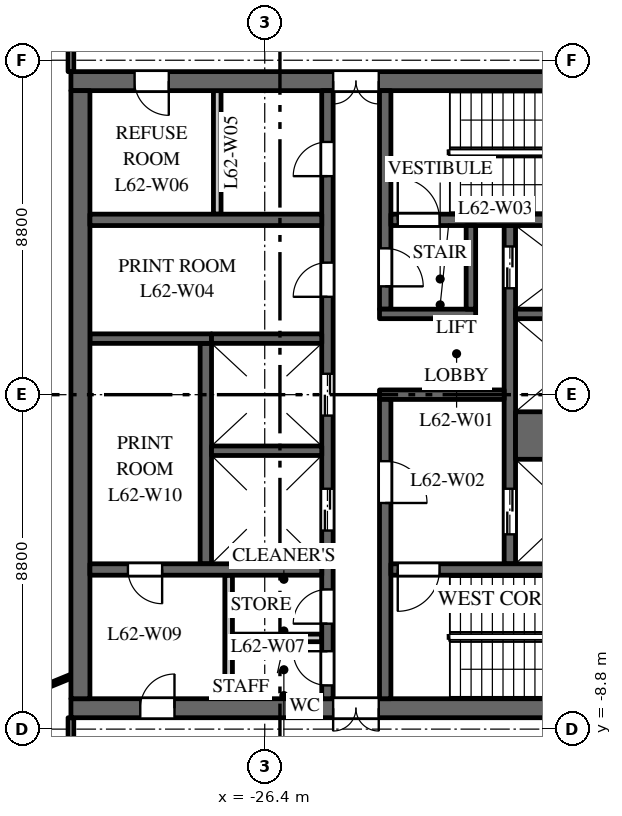
"""IFC4 building model, lengths in metres.
Left out: names, types, materials, properties, quantities, classifications, styles, units other than length and angle.
Written with IfcOpenShell. Run it as: python <this file> out.ifc"""

import sys

from ifc_helpers import new_model, si_unit, direction, frame, frame_2d, origin, place, context, subcontext, project, spatial, rectangle, extrude, element, fill, save


model = new_model("IFC4")
c1 = context("Model", 3, precision=1e-05, world=origin(), true_north=direction((0.0, 1.0)))
c2 = subcontext(c1, "Body", "Model", "MODEL_VIEW")
j1 = project(units=[si_unit("LENGTHUNIT", "METRE"), si_unit("PLANEANGLEUNIT", "RADIAN")], contexts=[c1])
p1 = place(None, origin())
s1 = spatial("IfcSite", under=j1, at=p1, CompositionType="ELEMENT")
p2 = place(p1, origin())
s2 = spatial("IfcBuilding", under=s1, at=p2, CompositionType="ELEMENT")
p3 = place(p2, frame((0.0, 0.0, 291.0)))
s3 = spatial("IfcBuildingStorey", under=s2, at=p3, CompositionType="ELEMENT", Elevation=291.0)
p4 = place(p3, frame((-16.5, 8.25, 0.0), z_axis=(0.0, 0.0, 1.0), x_axis=(-1.0, 0.0, 0.0)))
e1 = element("IfcWall", 1, at=p4, inside=s3, PredefinedType="SHEAR", context=c2, shape_type="SweptSolid", body=[
    extrude(rectangle(XDim=15.0, YDim=0.5, at=frame_2d((7.5, 0.0))), origin(), (0.0, 0.0, 1.0), 3.7),
])
p5 = place(p4, frame((6.9, 0.0, 0.0)))
e2 = element("IfcOpeningElement", 2, at=p5, cuts=e1, PredefinedType="OPENING", context=c2, shape_type="SweptSolid", body=[
    extrude(rectangle(XDim=1.2, YDim=2.1, at=frame_2d((0.6, 1.05))), frame((0.0, 0.26, 0.0), z_axis=(0.0, -1.0, 0.0), x_axis=(1.0, 0.0, 0.0)), (0.0, 0.0, 1.0), 0.52),
])
p6 = place(p4, frame((12.425, 0.0, 0.0)))
e3 = element("IfcOpeningElement", 3, at=p6, cuts=e1, PredefinedType="OPENING", context=c2, shape_type="SweptSolid", body=[
    extrude(rectangle(XDim=0.9, YDim=2.1, at=frame_2d((0.45, 1.05))), frame((0.0, 0.26, 0.0), z_axis=(0.0, -1.0, 0.0), x_axis=(1.0, 0.0, 0.0)), (0.0, 0.0, 1.0), 0.52),
])
p7 = place(p3, frame((-16.5, -8.25, 0.0), z_axis=(0.0, 0.0, 1.0), x_axis=(-1.0, 0.0, 0.0)))
e4 = element("IfcWall", 4, at=p7, inside=s3, PredefinedType="SHEAR", context=c2, shape_type="SweptSolid", body=[
    extrude(rectangle(XDim=15.0, YDim=0.5, at=frame_2d((7.5, 0.0))), origin(), (0.0, 0.0, 1.0), 3.7),
])
p8 = place(p7, frame((6.9, 0.0, 0.0)))
e5 = element("IfcOpeningElement", 5, at=p8, cuts=e4, PredefinedType="OPENING", context=c2, shape_type="SweptSolid", body=[
    extrude(rectangle(XDim=1.2, YDim=2.1, at=frame_2d((0.6, 1.05))), frame((0.0, 0.26, 0.0), z_axis=(0.0, -1.0, 0.0), x_axis=(1.0, 0.0, 0.0)), (0.0, 0.0, 1.0), 0.52),
])
p9 = place(p7, frame((12.275, 0.0, 0.0)))
e6 = element("IfcOpeningElement", 6, at=p9, cuts=e4, PredefinedType="OPENING", context=c2, shape_type="SweptSolid", body=[
    extrude(rectangle(XDim=0.9, YDim=2.1, at=frame_2d((0.45, 1.05))), frame((0.0, 0.26, 0.0), z_axis=(0.0, -1.0, 0.0), x_axis=(1.0, 0.0, 0.0)), (0.0, 0.0, 1.0), 0.52),
])
p10 = place(p3, frame((-27.95, -4.45, 0.0), z_axis=(0.0, 0.0, 1.0), x_axis=(0.0, 1.0, 0.0)))
e7 = element("IfcWall", 7, at=p10, inside=s3, PredefinedType="SHEAR", context=c2, shape_type="SweptSolid", body=[
    extrude(rectangle(XDim=5.8, YDim=0.3, at=frame_2d((2.9, 0.0))), origin(), (0.0, 0.0, 1.0), 3.7),
])
p11 = place(p3, frame((-27.8, 1.475, 0.0), z_axis=(0.0, 0.0, 1.0), x_axis=(-1.0, 0.0, 0.0)))
e8 = element("IfcWall", 8, at=p11, inside=s3, PredefinedType="SHEAR", context=c2, shape_type="SweptSolid", body=[
    extrude(rectangle(XDim=3.2, YDim=0.25, at=frame_2d((1.6, 0.0))), origin(), (0.0, 0.0, 1.0), 3.7),
])
p12 = place(p3, frame((-19.95, -4.45, 0.0), z_axis=(0.0, 0.0, 1.0), x_axis=(0.0, 1.0, 0.0)))
e9 = element("IfcWall", 9, at=p12, inside=s3, PredefinedType="SHEAR", context=c2, shape_type="SweptSolid", body=[
    extrude(rectangle(XDim=8.9, YDim=0.3, at=frame_2d((4.45, 0.0))), origin(), (0.0, 0.0, 1.0), 3.7),
])
p13 = place(p12, frame((0.775, 0.0, 0.0)))
e10 = element("IfcOpeningElement", 10, at=p13, cuts=e9, PredefinedType="OPENING", context=c2, shape_type="SweptSolid", body=[
    extrude(rectangle(XDim=1.2, YDim=2.1, at=frame_2d((0.6, 1.05))), frame((0.0, 0.16, 0.0), z_axis=(0.0, -1.0, 0.0), x_axis=(1.0, 0.0, 0.0)), (0.0, 0.0, 1.0), 0.32),
])
p14 = place(p12, frame((7.25, 0.0, 0.0)))
e11 = element("IfcOpeningElement", 11, at=p14, cuts=e9, PredefinedType="OPENING", context=c2, shape_type="SweptSolid", body=[
    extrude(rectangle(XDim=1.1, YDim=2.1, at=frame_2d((0.55, 1.05))), frame((0.0, 0.16, 0.0), z_axis=(0.0, -1.0, 0.0), x_axis=(1.0, 0.0, 0.0)), (0.0, 0.0, 1.0), 0.32),
])
p15 = place(p3, frame((-24.75, -8.0, 0.0), z_axis=(0.0, 0.0, 1.0), x_axis=(0.0, 1.0, 0.0)))
e12 = element("IfcWall", 12, at=p15, inside=s3, PredefinedType="SHEAR", context=c2, shape_type="SweptSolid", body=[
    extrude(rectangle(XDim=16.0, YDim=0.3, at=frame_2d((8.0, 0.0))), origin(), (0.0, 0.0, 1.0), 3.7),
])
p16 = place(p15, frame((4.425, 0.0, 0.0)))
e13 = element("IfcOpeningElement", 13, at=p16, cuts=e12, PredefinedType="OPENING", context=c2, shape_type="SweptSolid", body=[
    extrude(rectangle(XDim=1.1, YDim=2.1, at=frame_2d((0.55, 1.05))), frame((0.0, 0.16, 0.0), z_axis=(0.0, -1.0, 0.0), x_axis=(1.0, 0.0, 0.0)), (0.0, 0.0, 1.0), 0.32),
])
p17 = place(p15, frame((7.45, 0.0, 0.0)))
e14 = element("IfcOpeningElement", 14, at=p17, cuts=e12, PredefinedType="OPENING", context=c2, shape_type="SweptSolid", body=[
    extrude(rectangle(XDim=1.1, YDim=2.1, at=frame_2d((0.55, 1.05))), frame((0.0, 0.16, 0.0), z_axis=(0.0, -1.0, 0.0), x_axis=(1.0, 0.0, 0.0)), (0.0, 0.0, 1.0), 0.32),
])
p18 = place(p15, frame((10.575, 0.0, 0.0)))
e15 = element("IfcOpeningElement", 15, at=p18, cuts=e12, PredefinedType="OPENING", context=c2, shape_type="SweptSolid", body=[
    extrude(rectangle(XDim=0.9, YDim=2.1, at=frame_2d((0.45, 1.05))), frame((0.0, 0.16, 0.0), z_axis=(0.0, -1.0, 0.0), x_axis=(1.0, 0.0, 0.0)), (0.0, 0.0, 1.0), 0.32),
])
p19 = place(p15, frame((13.75, 0.0, 0.0)))
e16 = element("IfcOpeningElement", 16, at=p19, cuts=e12, PredefinedType="OPENING", context=c2, shape_type="SweptSolid", body=[
    extrude(rectangle(XDim=0.9, YDim=2.1, at=frame_2d((0.45, 1.05))), frame((0.0, 0.16, 0.0), z_axis=(0.0, -1.0, 0.0), x_axis=(1.0, 0.0, 0.0)), (0.0, 0.0, 1.0), 0.32),
])
p20 = place(p15, frame((1.975, 0.0, 0.0)))
e17 = element("IfcOpeningElement", 17, at=p20, cuts=e12, PredefinedType="OPENING", context=c2, shape_type="SweptSolid", body=[
    extrude(rectangle(XDim=0.9, YDim=2.1, at=frame_2d((0.45, 1.05))), frame((0.0, 0.16, 0.0), z_axis=(0.0, -1.0, 0.0), x_axis=(1.0, 0.0, 0.0)), (0.0, 0.0, 1.0), 0.32),
])
p21 = place(p15, frame((0.35, 0.0, 0.0)))
e18 = element("IfcOpeningElement", 18, at=p21, cuts=e12, PredefinedType="OPENING", context=c2, shape_type="SweptSolid", body=[
    extrude(rectangle(XDim=0.9, YDim=2.1, at=frame_2d((0.45, 1.05))), frame((0.0, 0.16, 0.0), z_axis=(0.0, -1.0, 0.0), x_axis=(1.0, 0.0, 0.0)), (0.0, 0.0, 1.0), 0.32),
])
p22 = place(p3, frame((-20.1, 0.0, 0.0), z_axis=(0.0, 0.0, 1.0), x_axis=(-1.0, 0.0, 0.0)))
e19 = element("IfcWall", 19, at=p22, inside=s3, PredefinedType="SHEAR", context=c2, shape_type="SweptSolid", body=[
    extrude(rectangle(XDim=3.28, YDim=0.25, at=frame_2d((1.64, 0.0))), origin(), (0.0, 0.0, 1.0), 3.7),
])
p23 = place(p3, frame((-31.25, -8.0, 0.0), z_axis=(0.0, 0.0, 1.0), x_axis=(0.0, 1.0, 0.0)))
e20 = element("IfcWall", 20, at=p23, inside=s3, PredefinedType="SHEAR", context=c2, shape_type="SweptSolid", body=[
    extrude(rectangle(XDim=16.0, YDim=0.5, at=frame_2d((8.0, 0.0))), origin(), (0.0, 0.0, 1.0), 3.7),
])
p24 = place(p3, frame((-24.9, 4.6, 0.0), z_axis=(0.0, 0.0, 1.0), x_axis=(-1.0, 0.0, 0.0)))
e21 = element("IfcWall", 21, at=p24, inside=s3, PredefinedType="SHEAR", context=c2, shape_type="SweptSolid", body=[
    extrude(rectangle(XDim=6.1, YDim=0.3, at=frame_2d((3.05, 0.0))), origin(), (0.0, 0.0, 1.0), 3.7),
])
for number, where, z_axis, x_axis in (
    (22, (-27.65, 4.75, 0.0), (0.0, 0.0, 1.0), (0.0, 1.0, 0.0)),
    (23, (-27.35, -8.0, 0.0), (0.0, 0.0, 1.0), (0.0, 1.0, 0.0)),
):
    element("IfcWall", number, at=place(p3, frame(where, z_axis=z_axis, x_axis=x_axis)), inside=s3, PredefinedType="PARTITIONING", context=c2, shape_type="SweptSolid", body=[
        extrude(rectangle(XDim=3.25, YDim=0.2, at=frame_2d((1.625, 0.0))), origin(), (0.0, 0.0, 1.0), 3.7),
    ])
p25 = place(p3, frame((-24.9, -6.4, 0.0), z_axis=(0.0, 0.0, 1.0), x_axis=(-1.0, 0.0, 0.0)))
e24 = element("IfcWall", 24, at=p25, inside=s3, PredefinedType="PARTITIONING", context=c2, shape_type="SweptSolid", body=[
    extrude(rectangle(XDim=2.35, YDim=0.2, at=frame_2d((1.175, 0.0))), origin(), (0.0, 0.0, 1.0), 3.7),
])
p26 = place(p3, frame((-24.9, -4.6, 0.0), z_axis=(0.0, 0.0, 1.0), x_axis=(-1.0, 0.0, 0.0)))
e25 = element("IfcWall", 25, at=p26, inside=s3, PredefinedType="SHEAR", context=c2, shape_type="SweptSolid", body=[
    extrude(rectangle(XDim=6.1, YDim=0.3, at=frame_2d((3.05, 0.0))), origin(), (0.0, 0.0, 1.0), 3.7),
])
p27 = place(p26, frame((4.2, 0.0, 0.0)))
e26 = element("IfcOpeningElement", 26, at=p27, cuts=e25, PredefinedType="OPENING", context=c2, shape_type="SweptSolid", body=[
    extrude(rectangle(XDim=0.9, YDim=2.1, at=frame_2d((0.45, 1.05))), frame((0.0, 0.16, 0.0), z_axis=(0.0, -1.0, 0.0), x_axis=(1.0, 0.0, 0.0)), (0.0, 0.0, 1.0), 0.32),
])
p28 = place(p3, frame((-16.9, -1.075, 0.0), z_axis=(0.0, 0.0, 1.0), x_axis=(-1.0, 0.0, 0.0)))
e27 = element("IfcWall", 27, at=p28, inside=s3, PredefinedType="SHEAR", context=c2, shape_type="SweptSolid", body=[
    extrude(rectangle(XDim=2.9, YDim=1.25, at=frame_2d((1.45, 0.0))), origin(), (0.0, 0.0, 1.0), 3.7),
])
for number, where, z_axis, x_axis in (
    (28, (-16.9, 2.125, 0.0), (0.0, 0.0, 1.0), (-1.0, 0.0, 0.0)),
    (29, (-24.9, -1.475, 0.0), (0.0, 0.0, 1.0), (-1.0, 0.0, 0.0)),
    (30, (-24.9, 1.475, 0.0), (0.0, 0.0, 1.0), (-1.0, 0.0, 0.0)),
):
    element("IfcWall", number, at=place(p3, frame(where, z_axis=z_axis, x_axis=x_axis)), inside=s3, PredefinedType="SHEAR", context=c2, shape_type="SweptSolid", body=[
        extrude(rectangle(XDim=2.9, YDim=0.25, at=frame_2d((1.45, 0.0))), origin(), (0.0, 0.0, 1.0), 3.7),
    ])
p29 = place(p3, frame((-23.23, 2.25, 0.0), z_axis=(0.0, 0.0, 1.0), x_axis=(0.0, 1.0, 0.0)))
e31 = element("IfcWall", 31, at=p29, inside=s3, PredefinedType="SHEAR", context=c2, shape_type="SweptSolid", body=[
    extrude(rectangle(XDim=5.75, YDim=0.3, at=frame_2d((2.875, 0.0))), origin(), (0.0, 0.0, 1.0), 3.7),
])
p30 = place(p29, frame((0.6, 0.0, 0.0)))
e32 = element("IfcOpeningElement", 32, at=p30, cuts=e31, PredefinedType="OPENING", context=c2, shape_type="SweptSolid", body=[
    extrude(rectangle(XDim=1.0, YDim=2.1, at=frame_2d((0.5, 1.05))), frame((0.0, 0.16, 0.0), z_axis=(0.0, -1.0, 0.0), x_axis=(1.0, 0.0, 0.0)), (0.0, 0.0, 1.0), 0.32),
])
p31 = place(p3, frame((-23.23, -8.0, 0.0), z_axis=(0.0, 0.0, 1.0), x_axis=(0.0, 1.0, 0.0)))
e33 = element("IfcWall", 33, at=p31, inside=s3, PredefinedType="SHEAR", context=c2, shape_type="SweptSolid", body=[
    extrude(rectangle(XDim=7.875, YDim=0.3, at=frame_2d((3.938, 0.0))), origin(), (0.0, 0.0, 1.0), 3.7),
])
p32 = place(p31, frame((5.15, 0.0, 0.0)))
e34 = element("IfcOpeningElement", 34, at=p32, cuts=e33, PredefinedType="OPENING", context=c2, shape_type="SweptSolid", body=[
    extrude(rectangle(XDim=1.1, YDim=2.1, at=frame_2d((0.55, 1.05))), frame((0.0, 0.16, 0.0), z_axis=(0.0, -1.0, 0.0), x_axis=(1.0, 0.0, 0.0)), (0.0, 0.0, 1.0), 0.32),
])
p33 = place(p3, frame((-16.9, 4.6, 0.0), z_axis=(0.0, 0.0, 1.0), x_axis=(-1.0, 0.0, 0.0)))
e35 = element("IfcWall", 35, at=p33, inside=s3, PredefinedType="SHEAR", context=c2, shape_type="SweptSolid", body=[
    extrude(rectangle(XDim=6.18, YDim=0.3, at=frame_2d((3.09, 0.0))), origin(), (0.0, 0.0, 1.0), 3.7),
])
p34 = place(p33, frame((4.9, 0.0, 0.0)))
e36 = element("IfcOpeningElement", 36, at=p34, cuts=e35, PredefinedType="OPENING", context=c2, shape_type="SweptSolid", body=[
    extrude(rectangle(XDim=1.1, YDim=2.1, at=frame_2d((0.55, 1.05))), frame((0.0, 0.16, 0.0), z_axis=(0.0, -1.0, 0.0), x_axis=(1.0, 0.0, 0.0)), (0.0, 0.0, 1.0), 0.32),
])
p35 = place(p3, frame((-16.9, -4.6, 0.0), z_axis=(0.0, 0.0, 1.0), x_axis=(-1.0, 0.0, 0.0)))
e37 = element("IfcWall", 37, at=p35, inside=s3, PredefinedType="SHEAR", context=c2, shape_type="SweptSolid", body=[
    extrude(rectangle(XDim=6.18, YDim=0.3, at=frame_2d((3.09, 0.0))), origin(), (0.0, 0.0, 1.0), 3.7),
])
p36 = place(p35, frame((4.9, 0.0, 0.0)))
e38 = element("IfcOpeningElement", 38, at=p36, cuts=e37, PredefinedType="OPENING", context=c2, shape_type="SweptSolid", body=[
    extrude(rectangle(XDim=1.1, YDim=2.1, at=frame_2d((0.55, 1.05))), frame((0.0, 0.16, 0.0), z_axis=(0.0, -1.0, 0.0), x_axis=(1.0, 0.0, 0.0)), (0.0, 0.0, 1.0), 0.32),
])
p37 = place(p3, frame((-20.85, 2.125, 0.0), z_axis=(0.0, 0.0, 1.0), x_axis=(-1.0, 0.0, 0.0)))
e39 = element("IfcWall", 39, at=p37, inside=s3, PredefinedType="SHEAR", context=c2, shape_type="SweptSolid", body=[
    extrude(rectangle(XDim=2.53, YDim=0.25, at=frame_2d((1.265, 0.0))), origin(), (0.0, 0.0, 1.0), 3.7),
])
p38 = place(p3, frame((-20.975, 2.25, 0.0), z_axis=(0.0, 0.0, 1.0), x_axis=(0.0, 1.0, 0.0)))
e40 = element("IfcWall", 40, at=p38, inside=s3, PredefinedType="SHEAR", context=c2, shape_type="SweptSolid", body=[
    extrude(rectangle(XDim=2.2, YDim=0.25, at=frame_2d((1.1, 0.0))), origin(), (0.0, 0.0, 1.0), 3.7),
])
p39 = place(p3, frame((-34.234, -8.53, 0.0), z_axis=(0.0, 0.0, 1.0), x_axis=(0.925344112436, 0.379128307542, 0.0)))
e41 = element("IfcWall", 41, at=p39, inside=s3, PredefinedType="PARTITIONING", context=c2, shape_type="SweptSolid", body=[
    extrude(rectangle(XDim=2.954, YDim=0.1, at=frame_2d((1.477, 0.0))), origin(), (0.0, 0.0, 1.0), 3.0),
])
for number, where, z_axis, x_axis in (
    (42, (-31.5, -11.5, 0.0), (0.0, 0.0, 1.0), (0.0, 1.0, 0.0)),
    (43, (-31.5, 8.5, 0.0), (0.0, 0.0, 1.0), (0.0, 1.0, 0.0)),
):
    element("IfcWall", number, at=place(p3, frame(where, z_axis=z_axis, x_axis=x_axis)), inside=s3, PredefinedType="PARTITIONING", context=c2, shape_type="SweptSolid", body=[
        extrude(rectangle(XDim=3.0, YDim=0.15, at=frame_2d((1.5, 0.0))), origin(), (0.0, 0.0, 1.0), 3.0),
    ])
p40 = place(p13, origin())
e44 = element("IfcDoor", 44, at=p40, inside=s3, OperationType="DOUBLE_DOOR_SLIDING", PredefinedType="DOOR", context=c2, shape_type="SweptSolid", body=[
    extrude(rectangle(XDim=1.2, YDim=2.1, at=frame_2d((0.6, 1.05))), frame((0.0, 0.025, 0.0), z_axis=(0.0, -1.0, 0.0), x_axis=(1.0, 0.0, 0.0)), (0.0, 0.0, 1.0), 0.05),
])
fill(e10, e44)
p41 = place(p14, origin())
e45 = element("IfcDoor", 45, at=p41, inside=s3, OperationType="DOUBLE_DOOR_SLIDING", PredefinedType="DOOR", context=c2, shape_type="SweptSolid", body=[
    extrude(rectangle(XDim=1.1, YDim=2.1, at=frame_2d((0.55, 1.05))), frame((0.0, 0.025, 0.0), z_axis=(0.0, -1.0, 0.0), x_axis=(1.0, 0.0, 0.0)), (0.0, 0.0, 1.0), 0.05),
])
fill(e11, e45)
p42 = place(p16, origin())
e46 = element("IfcDoor", 46, at=p42, inside=s3, OperationType="DOUBLE_DOOR_SLIDING", PredefinedType="DOOR", context=c2, shape_type="SweptSolid", body=[
    extrude(rectangle(XDim=1.1, YDim=2.1, at=frame_2d((0.55, 1.05))), frame((0.0, 0.025, 0.0), z_axis=(0.0, -1.0, 0.0), x_axis=(1.0, 0.0, 0.0)), (0.0, 0.0, 1.0), 0.05),
])
fill(e13, e46)
p43 = place(p17, origin())
e47 = element("IfcDoor", 47, at=p43, inside=s3, OperationType="DOUBLE_DOOR_SLIDING", PredefinedType="DOOR", context=c2, shape_type="SweptSolid", body=[
    extrude(rectangle(XDim=1.1, YDim=2.1, at=frame_2d((0.55, 1.05))), frame((0.0, 0.025, 0.0), z_axis=(0.0, -1.0, 0.0), x_axis=(1.0, 0.0, 0.0)), (0.0, 0.0, 1.0), 0.05),
])
fill(e14, e47)
p44 = place(p34, origin())
e48 = element("IfcDoor", 48, at=p44, inside=s3, OperationType="SINGLE_SWING_RIGHT", PredefinedType="DOOR", context=c2, shape_type="SweptSolid", body=[
    extrude(rectangle(XDim=1.1, YDim=2.1, at=frame_2d((0.55, 1.05))), frame((0.0, 0.025, 0.0), z_axis=(0.0, -1.0, 0.0), x_axis=(1.0, 0.0, 0.0)), (0.0, 0.0, 1.0), 0.05),
])
fill(e36, e48)
p45 = place(p36, origin())
e49 = element("IfcDoor", 49, at=p45, inside=s3, OperationType="SINGLE_SWING_LEFT", PredefinedType="DOOR", context=c2, shape_type="SweptSolid", body=[
    extrude(rectangle(XDim=1.1, YDim=2.1, at=frame_2d((0.55, 1.05))), frame((0.0, 0.025, 0.0), z_axis=(0.0, -1.0, 0.0), x_axis=(1.0, 0.0, 0.0)), (0.0, 0.0, 1.0), 0.05),
])
fill(e38, e49)
p46 = place(p32, origin())
e50 = element("IfcDoor", 50, at=p46, inside=s3, OperationType="SINGLE_SWING_LEFT", PredefinedType="DOOR", context=c2, shape_type="SweptSolid", body=[
    extrude(rectangle(XDim=1.1, YDim=2.1, at=frame_2d((0.55, 1.05))), frame((0.0, 0.025, 0.0), z_axis=(0.0, -1.0, 0.0), x_axis=(1.0, 0.0, 0.0)), (0.0, 0.0, 1.0), 0.05),
])
fill(e34, e50)
p47 = place(p30, origin())
e51 = element("IfcDoor", 51, at=p47, inside=s3, OperationType="SINGLE_SWING_LEFT", PredefinedType="DOOR", context=c2, shape_type="SweptSolid", body=[
    extrude(rectangle(XDim=1.0, YDim=2.1, at=frame_2d((0.5, 1.05))), frame((0.0, 0.025, 0.0), z_axis=(0.0, -1.0, 0.0), x_axis=(1.0, 0.0, 0.0)), (0.0, 0.0, 1.0), 0.05),
])
fill(e32, e51)
p48 = place(p5, origin())
e52 = element("IfcDoor", 52, at=p48, inside=s3, OperationType="DOUBLE_DOOR_DOUBLE_SWING", PredefinedType="DOOR", context=c2, shape_type="SweptSolid", body=[
    extrude(rectangle(XDim=1.2, YDim=2.1, at=frame_2d((0.6, 1.05))), frame((0.0, 0.025, 0.0), z_axis=(0.0, -1.0, 0.0), x_axis=(1.0, 0.0, 0.0)), (0.0, 0.0, 1.0), 0.05),
])
fill(e2, e52)
p49 = place(p8, origin())
e53 = element("IfcDoor", 53, at=p49, inside=s3, OperationType="DOUBLE_DOOR_DOUBLE_SWING", PredefinedType="DOOR", context=c2, shape_type="SweptSolid", body=[
    extrude(rectangle(XDim=1.2, YDim=2.1, at=frame_2d((0.6, 1.05))), frame((0.0, 0.025, 0.0), z_axis=(0.0, -1.0, 0.0), x_axis=(1.0, 0.0, 0.0)), (0.0, 0.0, 1.0), 0.05),
])
fill(e5, e53)
p50 = place(p18, origin())
e54 = element("IfcDoor", 54, at=p50, inside=s3, OperationType="SINGLE_SWING_RIGHT", PredefinedType="DOOR", context=c2, shape_type="SweptSolid", body=[
    extrude(rectangle(XDim=0.9, YDim=2.1, at=frame_2d((0.45, 1.05))), frame((0.0, 0.025, 0.0), z_axis=(0.0, -1.0, 0.0), x_axis=(1.0, 0.0, 0.0)), (0.0, 0.0, 1.0), 0.05),
])
fill(e15, e54)
p51 = place(p19, origin())
e55 = element("IfcDoor", 55, at=p51, inside=s3, OperationType="SINGLE_SWING_RIGHT", PredefinedType="DOOR", context=c2, shape_type="SweptSolid", body=[
    extrude(rectangle(XDim=0.9, YDim=2.1, at=frame_2d((0.45, 1.05))), frame((0.0, 0.025, 0.0), z_axis=(0.0, -1.0, 0.0), x_axis=(1.0, 0.0, 0.0)), (0.0, 0.0, 1.0), 0.05),
])
fill(e16, e55)
p52 = place(p6, origin())
e56 = element("IfcDoor", 56, at=p52, inside=s3, OperationType="SINGLE_SWING_RIGHT", PredefinedType="DOOR", context=c2, shape_type="SweptSolid", body=[
    extrude(rectangle(XDim=0.9, YDim=2.1, at=frame_2d((0.45, 1.05))), frame((0.0, 0.025, 0.0), z_axis=(0.0, -1.0, 0.0), x_axis=(1.0, 0.0, 0.0)), (0.0, 0.0, 1.0), 0.05),
])
fill(e3, e56)
p53 = place(p20, origin())
e57 = element("IfcDoor", 57, at=p53, inside=s3, OperationType="SINGLE_SWING_RIGHT", PredefinedType="DOOR", context=c2, shape_type="SweptSolid", body=[
    extrude(rectangle(XDim=0.9, YDim=2.1, at=frame_2d((0.45, 1.05))), frame((0.0, 0.025, 0.0), z_axis=(0.0, -1.0, 0.0), x_axis=(1.0, 0.0, 0.0)), (0.0, 0.0, 1.0), 0.05),
])
fill(e17, e57)
p54 = place(p21, origin())
e58 = element("IfcDoor", 58, at=p54, inside=s3, OperationType="SINGLE_SWING_LEFT", PredefinedType="DOOR", context=c2, shape_type="SweptSolid", body=[
    extrude(rectangle(XDim=0.9, YDim=2.1, at=frame_2d((0.45, 1.05))), frame((0.0, 0.025, 0.0), z_axis=(0.0, -1.0, 0.0), x_axis=(1.0, 0.0, 0.0)), (0.0, 0.0, 1.0), 0.05),
])
fill(e18, e58)
p55 = place(p9, origin())
e59 = element("IfcDoor", 59, at=p55, inside=s3, OperationType="SINGLE_SWING_LEFT", PredefinedType="DOOR", context=c2, shape_type="SweptSolid", body=[
    extrude(rectangle(XDim=0.9, YDim=2.1, at=frame_2d((0.45, 1.05))), frame((0.0, 0.025, 0.0), z_axis=(0.0, -1.0, 0.0), x_axis=(1.0, 0.0, 0.0)), (0.0, 0.0, 1.0), 0.05),
])
fill(e6, e59)
p56 = place(p27, origin())
e60 = element("IfcDoor", 60, at=p56, inside=s3, OperationType="SINGLE_SWING_RIGHT", PredefinedType="DOOR", context=c2, shape_type="SweptSolid", body=[
    extrude(rectangle(XDim=0.9, YDim=2.1, at=frame_2d((0.45, 1.05))), frame((0.0, 0.025, 0.0), z_axis=(0.0, -1.0, 0.0), x_axis=(1.0, 0.0, 0.0)), (0.0, 0.0, 1.0), 0.05),
])
fill(e26, e60)
save(model, sys.argv[1])
